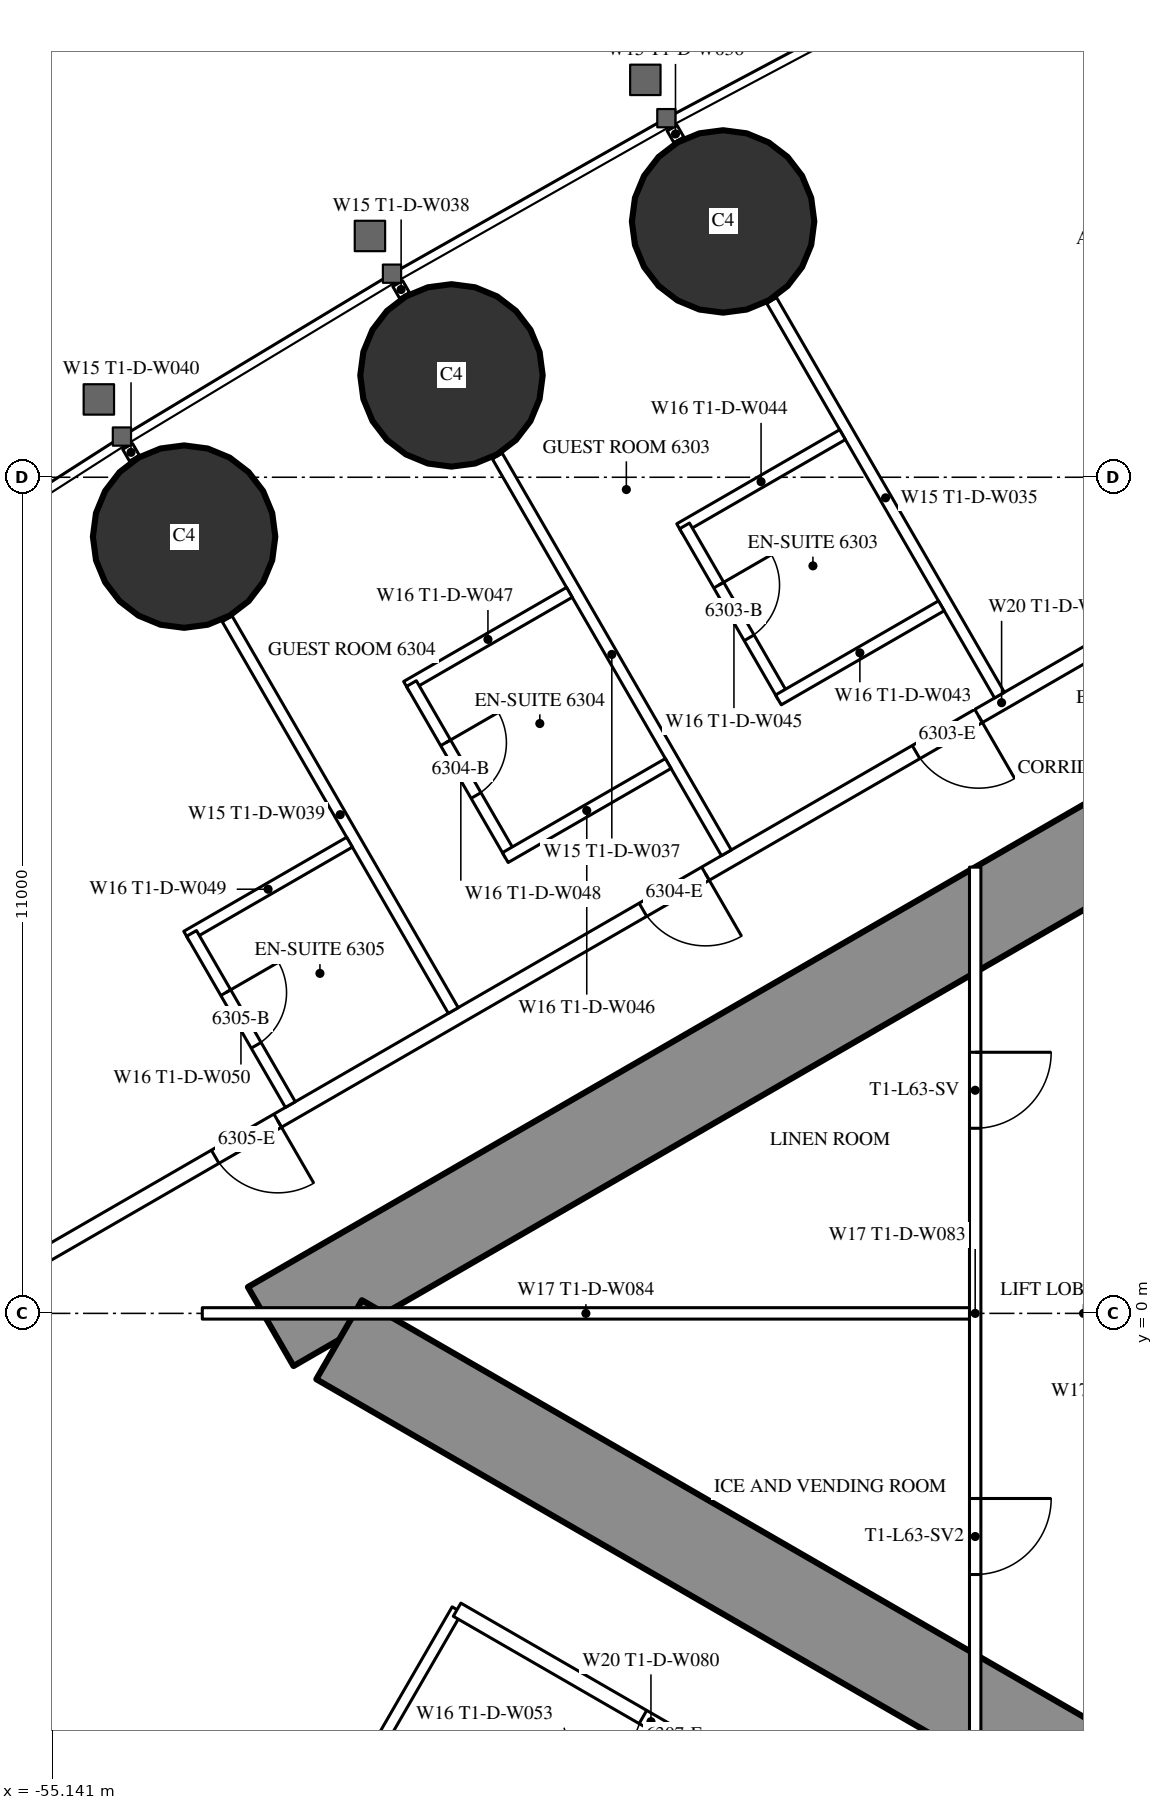
"""IFC4 building model, lengths in metres.
Left out: names, types, materials, properties, quantities, classifications, styles, units other than length and angle.
Written with IfcOpenShell. Run it as: python <this file> out.ifc"""

import sys

from ifc_helpers import new_model, si_unit, direction, frame, frame_2d, origin, origin_2d, place, context, subcontext, project, spatial, rectangle, circle, extrude, element, fill, save


model = new_model("IFC4")
c1 = context("Model", 3, precision=1e-05, world=origin(), true_north=direction((0.0, 1.0)))
c2 = subcontext(c1, "Body", "Model", "MODEL_VIEW")
j1 = project(units=[si_unit("LENGTHUNIT", "METRE"), si_unit("PLANEANGLEUNIT", "RADIAN")], contexts=[c1])
p1 = place(None, origin())
s1 = spatial("IfcSite", under=j1, at=p1, CompositionType="ELEMENT")
p2 = place(p1, origin())
s2 = spatial("IfcBuilding", under=s1, at=p2, CompositionType="ELEMENT")
p3 = place(p2, frame((0.0, 0.0, 236.9)))
s3 = spatial("IfcBuildingStorey", under=s2, at=p3, CompositionType="ELEMENT", Elevation=236.9)
for number, where, z_axis, x_axis in (
    (1, (-46.317, 14.365, 0.0), (0.0, 0.0, 1.0), (1.0, 0.0, 0.0)),
    (2, (-49.89, 12.34, 0.0), (0.0, 0.0, 1.0), (1.0, 0.0, 0.0)),
    (3, (-53.408, 10.219, 0.0), (0.0, 0.0, 1.0), (1.0, 0.0, 0.0)),
):
    element("IfcColumn", number, at=place(p3, frame(where, z_axis=z_axis, x_axis=x_axis)), inside=s3, PredefinedType="COLUMN", context=c2, shape_type="SweptSolid", body=[
        extrude(circle(Radius=1.2, at=origin_2d()), origin(), (0.0, 0.0, 1.0), 3.6),
    ])
p4 = place(p3, frame((-27.2, 14.3, 0.0), z_axis=(0.0, 0.0, 1.0), x_axis=(-0.866026593062, -0.499997940104, 0.0)))
e4 = element("IfcWall", 4, at=p4, inside=s3, PredefinedType="SHEAR", context=c2, shape_type="SweptSolid", body=[
    extrude(rectangle(XDim=28.946, YDim=1.2, at=frame_2d((14.473, 0.0))), origin(), (0.0, 0.0, 1.0), 3.6),
])
p5 = place(p4, frame((4.6, 0.0, 0.0)))
e5 = element("IfcOpeningElement", 5, at=p5, cuts=e4, PredefinedType="OPENING", context=c2, shape_type="SweptSolid", body=[
    extrude(rectangle(XDim=1.0, YDim=2.2, at=frame_2d((0.5, 1.1))), frame((0.0, 0.61, 0.0), z_axis=(0.0, -1.0, 0.0), x_axis=(1.0, 0.0, 0.0)), (0.0, 0.0, 1.0), 1.22),
])
p6 = place(p4, frame((13.395, 0.0, 0.0)))
e6 = element("IfcOpeningElement", 6, at=p6, cuts=e4, PredefinedType="OPENING", context=c2, shape_type="SweptSolid", body=[
    extrude(rectangle(XDim=1.8, YDim=2.2, at=frame_2d((0.9, 1.1))), frame((0.0, 0.61, 0.0), z_axis=(0.0, -1.0, 0.0), x_axis=(1.0, 0.0, 0.0)), (0.0, 0.0, 1.0), 1.22),
])
p7 = place(p3, frame((-27.2, -14.3, 0.0), z_axis=(0.0, 0.0, 1.0), x_axis=(-0.866024021859, 0.500002393557, 0.0)))
e7 = element("IfcWall", 7, at=p7, inside=s3, PredefinedType="SHEAR", context=c2, shape_type="SweptSolid", body=[
    extrude(rectangle(XDim=27.907, YDim=1.2, at=frame_2d((13.954, 0.0))), origin(), (0.0, 0.0, 1.0), 3.6),
])
p8 = place(p7, frame((4.6, 0.0, 0.0)))
e8 = element("IfcOpeningElement", 8, at=p8, cuts=e7, PredefinedType="OPENING", context=c2, shape_type="SweptSolid", body=[
    extrude(rectangle(XDim=1.0, YDim=2.2, at=frame_2d((0.5, 1.1))), frame((0.0, 0.61, 0.0), z_axis=(0.0, -1.0, 0.0), x_axis=(1.0, 0.0, 0.0)), (0.0, 0.0, 1.0), 1.22),
])
p9 = place(p7, frame((13.395, 0.0, 0.0)))
e9 = element("IfcOpeningElement", 9, at=p9, cuts=e7, PredefinedType="OPENING", context=c2, shape_type="SweptSolid", body=[
    extrude(rectangle(XDim=1.8, YDim=2.2, at=frame_2d((0.9, 1.1))), frame((0.0, 0.61, 0.0), z_axis=(0.0, -1.0, 0.0), x_axis=(1.0, 0.0, 0.0)), (0.0, 0.0, 1.0), 1.22),
])
p10 = place(p3, frame((-28.737, 16.068, 0.0), z_axis=(0.0, 0.0, 1.0), x_axis=(-0.866026057212, -0.499998868229, 0.0)))
e10 = element("IfcWall", 10, at=p10, inside=s3, PredefinedType="PARTITIONING", context=c2, shape_type="SweptSolid", body=[
    extrude(rectangle(XDim=32.137, YDim=0.2, at=frame_2d((16.068, 0.0))), origin(), (0.0, 0.0, 1.0), 3.35),
])
p11 = place(p10, frame((1.08, 0.0, 0.0)))
e11 = element("IfcOpeningElement", 11, at=p11, cuts=e10, PredefinedType="OPENING", context=c2, shape_type="SweptSolid", body=[
    extrude(rectangle(XDim=1.8, YDim=2.03, at=frame_2d((0.9, 1.015))), frame((0.0, 0.11, 0.0), z_axis=(0.0, -1.0, 0.0), x_axis=(1.0, 0.0, 0.0)), (0.0, 0.0, 1.0), 0.22),
])
p12 = place(p10, frame((6.86, 0.0, 0.0)))
e12 = element("IfcOpeningElement", 12, at=p12, cuts=e10, PredefinedType="OPENING", context=c2, shape_type="SweptSolid", body=[
    extrude(rectangle(XDim=1.0, YDim=2.2, at=frame_2d((0.5, 1.1))), frame((0.0, 0.11, 0.0), z_axis=(0.0, -1.0, 0.0), x_axis=(1.0, 0.0, 0.0)), (0.0, 0.0, 1.0), 0.22),
])
p13 = place(p10, frame((16.418, 0.0, 0.0)))
e13 = element("IfcOpeningElement", 13, at=p13, cuts=e10, PredefinedType="OPENING", context=c2, shape_type="SweptSolid", body=[
    extrude(rectangle(XDim=0.95, YDim=2.2, at=frame_2d((0.475, 1.1))), frame((0.0, 0.11, 0.0), z_axis=(0.0, -1.0, 0.0), x_axis=(1.0, 0.0, 0.0)), (0.0, 0.0, 1.0), 0.22),
])
p14 = place(p10, frame((20.567, 0.0, 0.0)))
e14 = element("IfcOpeningElement", 14, at=p14, cuts=e10, PredefinedType="OPENING", context=c2, shape_type="SweptSolid", body=[
    extrude(rectangle(XDim=0.95, YDim=2.2, at=frame_2d((0.475, 1.1))), frame((0.0, 0.11, 0.0), z_axis=(0.0, -1.0, 0.0), x_axis=(1.0, 0.0, 0.0)), (0.0, 0.0, 1.0), 0.22),
])
p15 = place(p10, frame((27.065, 0.0, 0.0)))
e15 = element("IfcOpeningElement", 15, at=p15, cuts=e10, PredefinedType="OPENING", context=c2, shape_type="SweptSolid", body=[
    extrude(rectangle(XDim=0.95, YDim=2.2, at=frame_2d((0.475, 1.1))), frame((0.0, 0.11, 0.0), z_axis=(0.0, -1.0, 0.0), x_axis=(1.0, 0.0, 0.0)), (0.0, 0.0, 1.0), 0.22),
])
p16 = place(p3, frame((-42.68, 8.134, 0.0), z_axis=(0.0, 0.0, 1.0), x_axis=(-0.499984479505, 0.866034364361, 0.0)))
e16 = element("IfcWall", 16, at=p16, inside=s3, PredefinedType="PARTITIONING", context=c2, shape_type="SweptSolid", body=[
    extrude(rectangle(XDim=5.995, YDim=0.15, at=frame_2d((2.998, 0.0))), origin(), (0.0, 0.0, 1.0), 2.45),
])
p17 = place(p3, frame((-46.898, 15.439, 0.0), z_axis=(0.0, 0.0, 1.0), x_axis=(-0.500232303069, 0.865891241997, 0.0)))
e17 = element("IfcWall", 17, at=p17, inside=s3, PredefinedType="PARTITIONING", context=c2, shape_type="SweptSolid", body=[
    extrude(rectangle(XDim=0.18, YDim=0.15, at=frame_2d((0.09, 0.0))), origin(), (0.0, 0.0, 1.0), 2.45),
])
p18 = place(p3, frame((-46.274, 6.059, 0.0), z_axis=(0.0, 0.0, 1.0), x_axis=(-0.500020471368, 0.866013584312, 0.0)))
e18 = element("IfcWall", 18, at=p18, inside=s3, PredefinedType="PARTITIONING", context=c2, shape_type="SweptSolid", body=[
    extrude(rectangle(XDim=6.028, YDim=0.15, at=frame_2d((3.014, 0.0))), origin(), (0.0, 0.0, 1.0), 2.45),
])
p19 = place(p3, frame((-50.508, 13.392, 0.0), z_axis=(0.0, 0.0, 1.0), x_axis=(-0.499644091975, 0.866230789891, 0.0)))
e19 = element("IfcWall", 19, at=p19, inside=s3, PredefinedType="PARTITIONING", context=c2, shape_type="SweptSolid", body=[
    extrude(rectangle(XDim=0.18, YDim=0.15, at=frame_2d((0.09, 0.0))), origin(), (0.0, 0.0, 1.0), 2.45),
])
p20 = place(p3, frame((-49.866, 3.985, 0.0), z_axis=(0.0, 0.0, 1.0), x_axis=(-0.500000694566, 0.866025002776, 0.0)))
e20 = element("IfcWall", 20, at=p20, inside=s3, PredefinedType="PARTITIONING", context=c2, shape_type="SweptSolid", body=[
    extrude(rectangle(XDim=5.95, YDim=0.15, at=frame_2d((2.975, 0.0))), origin(), (0.0, 0.0, 1.0), 2.45),
])
p21 = place(p3, frame((-54.061, 11.25, 0.0), z_axis=(0.0, 0.0, 1.0), x_axis=(-0.500391173478, 0.865799441849, 0.0)))
e21 = element("IfcWall", 21, at=p21, inside=s3, PredefinedType="PARTITIONING", context=c2, shape_type="SweptSolid", body=[
    extrude(rectangle(XDim=0.179, YDim=0.15, at=frame_2d((0.089, 0.0))), origin(), (0.0, 0.0, 1.0), 2.45),
])
p22 = place(p3, frame((-49.816, -3.898, 0.0), z_axis=(0.0, 0.0, 1.0), x_axis=(-0.500001913541, -0.866024298998, 0.0)))
e22 = element("IfcWall", 22, at=p22, inside=s3, PredefinedType="PARTITIONING", context=c2, shape_type="SweptSolid", body=[
    extrude(rectangle(XDim=6.05, YDim=0.15, at=frame_2d((3.025, 0.0))), origin(), (0.0, 0.0, 1.0), 2.45),
])
p23 = place(p3, frame((-44.745, 11.56, 0.0), z_axis=(0.0, 0.0, 1.0), x_axis=(-0.866006523861, -0.500032699561, 0.0)))
e23 = element("IfcWall", 23, at=p23, inside=s3, PredefinedType="PARTITIONING", context=c2, shape_type="SweptSolid", body=[
    extrude(rectangle(XDim=2.475, YDim=0.15, at=frame_2d((1.237, 0.0))), origin(), (0.0, 0.0, 1.0), 3.35),
])
p24 = place(p3, frame((-45.524, 8.109, 0.0), z_axis=(0.0, 0.0, 1.0), x_axis=(-0.49997716683, 0.86603858612, 0.0)))
e24 = element("IfcWall", 24, at=p24, inside=s3, PredefinedType="PARTITIONING", context=c2, shape_type="SweptSolid", body=[
    extrude(rectangle(XDim=2.6, YDim=0.15, at=frame_2d((1.3, 0.0))), origin(), (0.0, 0.0, 1.0), 3.35),
])
p25 = place(p24, frame((0.9, 0.0, 0.0)))
e25 = element("IfcOpeningElement", 25, at=p25, cuts=e24, PredefinedType="OPENING", context=c2, shape_type="SweptSolid", body=[
    extrude(rectangle(XDim=0.8, YDim=2.2, at=frame_2d((0.4, 1.1))), frame((0.0, 0.085, 0.0), z_axis=(0.0, -1.0, 0.0), x_axis=(1.0, 0.0, 0.0)), (0.0, 0.0, 1.0), 0.17),
])
p26 = place(p3, frame((-43.445, 9.309, 0.0), z_axis=(0.0, 0.0, 1.0), x_axis=(-0.866031185235, -0.4999899861, 0.0)))
e26 = element("IfcWall", 26, at=p26, inside=s3, PredefinedType="PARTITIONING", context=c2, shape_type="SweptSolid", body=[
    extrude(rectangle(XDim=2.475, YDim=0.15, at=frame_2d((1.238, 0.0))), origin(), (0.0, 0.0, 1.0), 3.35),
])
p27 = place(p3, frame((-48.339, 9.486, 0.0), z_axis=(0.0, 0.0, 1.0), x_axis=(-0.866006523861, -0.500032699561, 0.0)))
e27 = element("IfcWall", 27, at=p27, inside=s3, PredefinedType="PARTITIONING", context=c2, shape_type="SweptSolid", body=[
    extrude(rectangle(XDim=2.475, YDim=0.15, at=frame_2d((1.237, 0.0))), origin(), (0.0, 0.0, 1.0), 3.35),
])
p28 = place(p3, frame((-49.117, 6.034, 0.0), z_axis=(0.0, 0.0, 1.0), x_axis=(-0.500006934395, 0.866021400173, 0.0)))
e28 = element("IfcWall", 28, at=p28, inside=s3, PredefinedType="PARTITIONING", context=c2, shape_type="SweptSolid", body=[
    extrude(rectangle(XDim=2.6, YDim=0.15, at=frame_2d((1.3, 0.0))), origin(), (0.0, 0.0, 1.0), 3.35),
])
p29 = place(p28, frame((0.9, 0.0, 0.0)))
e29 = element("IfcOpeningElement", 29, at=p29, cuts=e28, PredefinedType="OPENING", context=c2, shape_type="SweptSolid", body=[
    extrude(rectangle(XDim=0.8, YDim=2.2, at=frame_2d((0.4, 1.1))), frame((0.0, 0.085, 0.0), z_axis=(0.0, -1.0, 0.0), x_axis=(1.0, 0.0, 0.0)), (0.0, 0.0, 1.0), 0.17),
])
for number, where, z_axis, x_axis in (
    (30, (-47.039, 7.234, 0.0), (0.0, 0.0, 1.0), (-0.866, -0.5, 0.0)),
    (31, (-51.231, 6.199, 0.0), (0.0, 0.0, 1.0), (-0.866, -0.5, 0.0)),
):
    element("IfcWall", number, at=place(p3, frame(where, z_axis=z_axis, x_axis=x_axis)), inside=s3, PredefinedType="PARTITIONING", context=c2, shape_type="SweptSolid", body=[
        extrude(rectangle(XDim=2.475, YDim=0.15, at=frame_2d((1.238, 0.0))), origin(), (0.0, 0.0, 1.0), 3.35),
    ])
p30 = place(p3, frame((-52.01, 2.747, 0.0), z_axis=(0.0, 0.0, 1.0), x_axis=(-0.500006934395, 0.866021400173, 0.0)))
e32 = element("IfcWall", 32, at=p30, inside=s3, PredefinedType="PARTITIONING", context=c2, shape_type="SweptSolid", body=[
    extrude(rectangle(XDim=2.6, YDim=0.15, at=frame_2d((1.3, 0.0))), origin(), (0.0, 0.0, 1.0), 3.35),
])
p31 = place(p30, frame((0.9, 0.0, 0.0)))
e33 = element("IfcOpeningElement", 33, at=p31, cuts=e32, PredefinedType="OPENING", context=c2, shape_type="SweptSolid", body=[
    extrude(rectangle(XDim=0.8, YDim=2.2, at=frame_2d((0.4, 1.1))), frame((0.0, 0.085, 0.0), z_axis=(0.0, -1.0, 0.0), x_axis=(1.0, 0.0, 0.0)), (0.0, 0.0, 1.0), 0.17),
])
p32 = place(p3, frame((-44.715, -6.844, 0.0), z_axis=(0.0, 0.0, 1.0), x_axis=(-0.866020627653, 0.50000827241, 0.0)))
e34 = element("IfcWall", 34, at=p32, inside=s3, PredefinedType="PARTITIONING", context=c2, shape_type="SweptSolid", body=[
    extrude(rectangle(XDim=5.891, YDim=0.2, at=frame_2d((2.945, 0.0))), origin(), (0.0, 0.0, 1.0), 3.35),
])
p33 = place(p32, frame((2.117, 0.0, 0.0)))
e35 = element("IfcOpeningElement", 35, at=p33, cuts=e34, PredefinedType="OPENING", context=c2, shape_type="SweptSolid", body=[
    extrude(rectangle(XDim=0.95, YDim=2.2, at=frame_2d((0.475, 1.1))), frame((0.0, 0.11, 0.0), z_axis=(0.0, -1.0, 0.0), x_axis=(1.0, 0.0, 0.0)), (0.0, 0.0, 1.0), 0.22),
])
p34 = place(p32, frame((0.5, 0.0, 0.0)))
e36 = element("IfcOpeningElement", 36, at=p34, cuts=e34, PredefinedType="OPENING", context=c2, shape_type="SweptSolid", body=[
    extrude(rectangle(XDim=0.967, YDim=2.2, at=frame_2d((0.483, 1.1))), frame((0.0, 0.11, 0.0), z_axis=(0.0, -1.0, 0.0), x_axis=(1.0, 0.0, 0.0)), (0.0, 0.0, 1.0), 0.22),
])
p35 = place(p3, frame((-43.0, 5.871, 0.0), z_axis=(0.0, 0.0, 1.0), x_axis=(0.0, -1.0, 0.0)))
e37 = element("IfcWall", 37, at=p35, inside=s3, PredefinedType="PARTITIONING", context=c2, shape_type="SweptSolid", body=[
    extrude(rectangle(XDim=11.741, YDim=0.15, at=frame_2d((5.871, 0.0))), origin(), (0.0, 0.0, 1.0), 3.35),
])
p36 = place(p35, frame((2.435, 0.0, 0.0)))
e38 = element("IfcOpeningElement", 38, at=p36, cuts=e37, PredefinedType="OPENING", context=c2, shape_type="SweptSolid", body=[
    extrude(rectangle(XDim=1.0, YDim=2.2, at=frame_2d((0.5, 1.1))), frame((0.0, 0.085, 0.0), z_axis=(0.0, -1.0, 0.0), x_axis=(1.0, 0.0, 0.0)), (0.0, 0.0, 1.0), 0.17),
])
p37 = place(p35, frame((8.306, 0.0, 0.0)))
e39 = element("IfcOpeningElement", 39, at=p37, cuts=e37, PredefinedType="OPENING", context=c2, shape_type="SweptSolid", body=[
    extrude(rectangle(XDim=1.0, YDim=2.2, at=frame_2d((0.5, 1.1))), frame((0.0, 0.085, 0.0), z_axis=(0.0, -1.0, 0.0), x_axis=(1.0, 0.0, 0.0)), (0.0, 0.0, 1.0), 0.17),
])
p38 = place(p3, frame((-43.075, 0.0, 0.0), z_axis=(0.0, 0.0, 1.0), x_axis=(-1.0, 0.0, 0.0)))
e40 = element("IfcWall", 40, at=p38, inside=s3, PredefinedType="PARTITIONING", context=c2, shape_type="SweptSolid", body=[
    extrude(rectangle(XDim=10.093, YDim=0.15, at=frame_2d((5.047, 0.0))), origin(), (0.0, 0.0, 1.0), 2.45),
])
p39 = place(p25, origin())
e41 = element("IfcDoor", 41, at=p39, inside=s3, OperationType="SINGLE_SWING_RIGHT", PredefinedType="DOOR", context=c2, shape_type="SweptSolid", body=[
    extrude(rectangle(XDim=0.8, YDim=2.2, at=frame_2d((0.4, 1.1))), frame((0.0, 0.025, 0.0), z_axis=(0.0, -1.0, 0.0), x_axis=(1.0, 0.0, 0.0)), (0.0, 0.0, 1.0), 0.05),
])
fill(e25, e41)
p40 = place(p13, origin())
e42 = element("IfcDoor", 42, at=p40, inside=s3, OperationType="SINGLE_SWING_LEFT", PredefinedType="DOOR", context=c2, shape_type="SweptSolid", body=[
    extrude(rectangle(XDim=0.95, YDim=2.2, at=frame_2d((0.475, 1.1))), frame((0.0, 0.025, 0.0), z_axis=(0.0, -1.0, 0.0), x_axis=(1.0, 0.0, 0.0)), (0.0, 0.0, 1.0), 0.05),
])
fill(e13, e42)
p41 = place(p29, origin())
e43 = element("IfcDoor", 43, at=p41, inside=s3, OperationType="SINGLE_SWING_RIGHT", PredefinedType="DOOR", context=c2, shape_type="SweptSolid", body=[
    extrude(rectangle(XDim=0.8, YDim=2.2, at=frame_2d((0.4, 1.1))), frame((0.0, 0.025, 0.0), z_axis=(0.0, -1.0, 0.0), x_axis=(1.0, 0.0, 0.0)), (0.0, 0.0, 1.0), 0.05),
])
fill(e29, e43)
p42 = place(p14, origin())
e44 = element("IfcDoor", 44, at=p42, inside=s3, OperationType="SINGLE_SWING_LEFT", PredefinedType="DOOR", context=c2, shape_type="SweptSolid", body=[
    extrude(rectangle(XDim=0.95, YDim=2.2, at=frame_2d((0.475, 1.1))), frame((0.0, 0.025, 0.0), z_axis=(0.0, -1.0, 0.0), x_axis=(1.0, 0.0, 0.0)), (0.0, 0.0, 1.0), 0.05),
])
fill(e14, e44)
p43 = place(p31, origin())
e45 = element("IfcDoor", 45, at=p43, inside=s3, OperationType="SINGLE_SWING_RIGHT", PredefinedType="DOOR", context=c2, shape_type="SweptSolid", body=[
    extrude(rectangle(XDim=0.8, YDim=2.2, at=frame_2d((0.4, 1.1))), frame((0.0, 0.025, 0.0), z_axis=(0.0, -1.0, 0.0), x_axis=(1.0, 0.0, 0.0)), (0.0, 0.0, 1.0), 0.05),
])
fill(e33, e45)
p44 = place(p15, origin())
e46 = element("IfcDoor", 46, at=p44, inside=s3, OperationType="SINGLE_SWING_LEFT", PredefinedType="DOOR", context=c2, shape_type="SweptSolid", body=[
    extrude(rectangle(XDim=0.95, YDim=2.2, at=frame_2d((0.475, 1.1))), frame((0.0, 0.025, 0.0), z_axis=(0.0, -1.0, 0.0), x_axis=(1.0, 0.0, 0.0)), (0.0, 0.0, 1.0), 0.05),
])
fill(e15, e46)
p45 = place(p33, origin())
e47 = element("IfcDoor", 47, at=p45, inside=s3, OperationType="SINGLE_SWING_LEFT", PredefinedType="DOOR", context=c2, shape_type="SweptSolid", body=[
    extrude(rectangle(XDim=0.95, YDim=2.2, at=frame_2d((0.475, 1.1))), frame((0.0, 0.025, 0.0), z_axis=(0.0, -1.0, 0.0), x_axis=(1.0, 0.0, 0.0)), (0.0, 0.0, 1.0), 0.05),
])
fill(e35, e47)
p46 = place(p36, origin())
e48 = element("IfcDoor", 48, at=p46, inside=s3, OperationType="SINGLE_SWING_LEFT", PredefinedType="DOOR", context=c2, shape_type="SweptSolid", body=[
    extrude(rectangle(XDim=1.0, YDim=2.2, at=frame_2d((0.5, 1.1))), frame((0.0, 0.025, 0.0), z_axis=(0.0, -1.0, 0.0), x_axis=(1.0, 0.0, 0.0)), (0.0, 0.0, 1.0), 0.05),
])
fill(e38, e48)
p47 = place(p37, origin())
e49 = element("IfcDoor", 49, at=p47, inside=s3, OperationType="SINGLE_SWING_LEFT", PredefinedType="DOOR", context=c2, shape_type="SweptSolid", body=[
    extrude(rectangle(XDim=1.0, YDim=2.2, at=frame_2d((0.5, 1.1))), frame((0.0, 0.025, 0.0), z_axis=(0.0, -1.0, 0.0), x_axis=(1.0, 0.0, 0.0)), (0.0, 0.0, 1.0), 0.05),
])
fill(e39, e49)
save(model, sys.argv[1])
